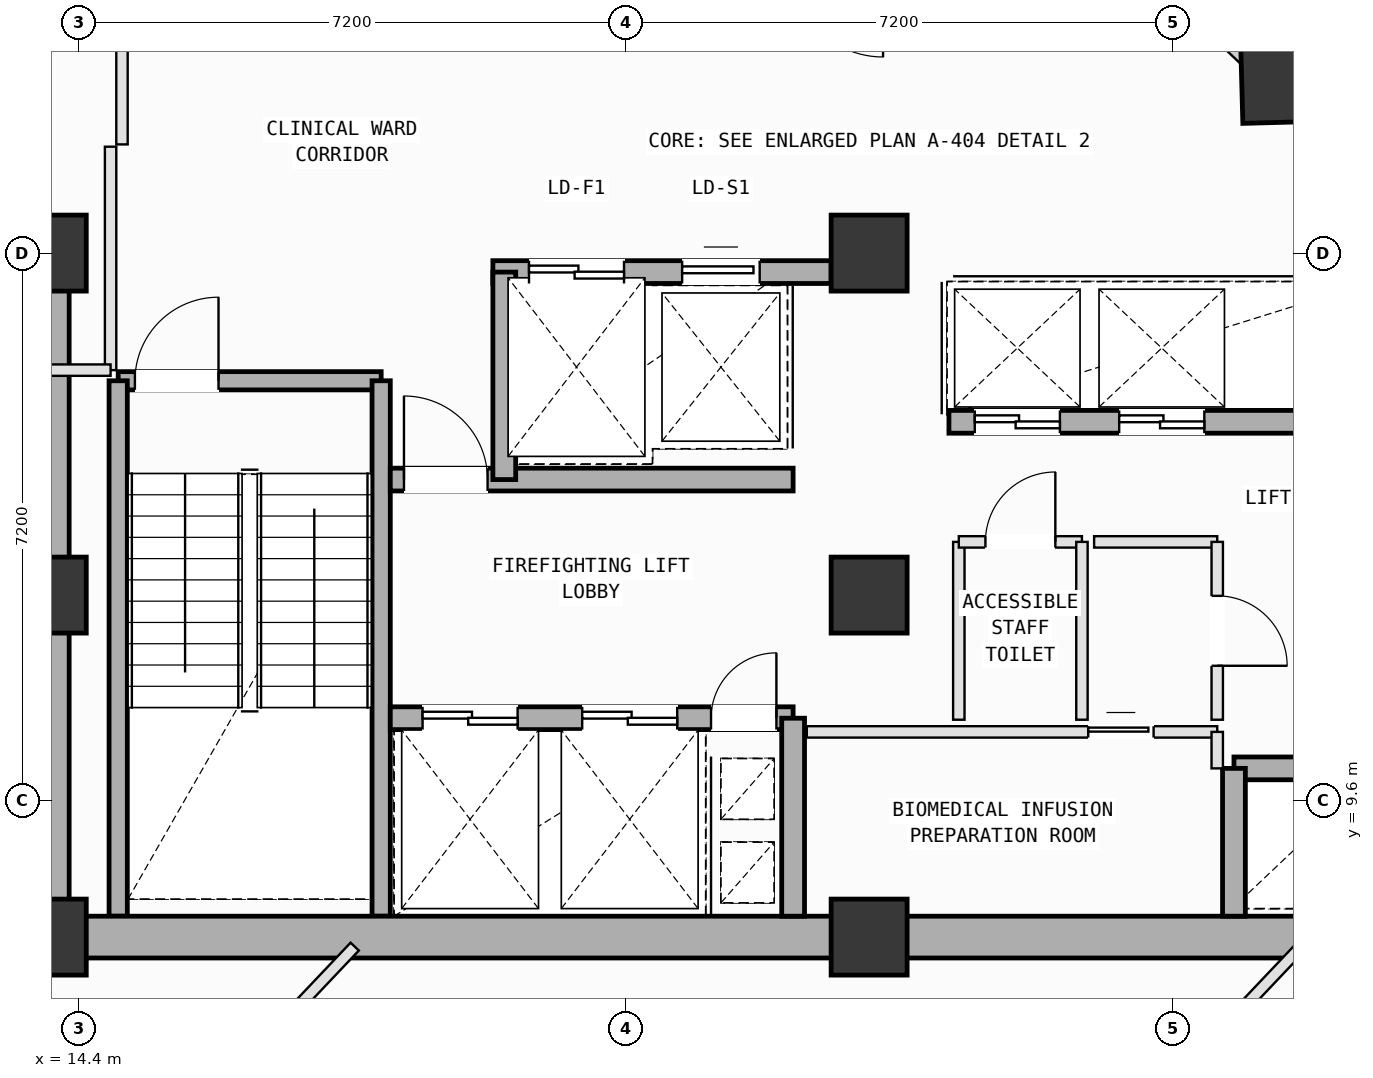
"""IFC4 building model, lengths in metres.
Left out: names, types, materials, properties, quantities, classifications, styles, units other than length and angle.
Written with IfcOpenShell. Run it as: python <this file> out.ifc"""

import sys

from ifc_helpers import new_model, si_unit, direction, frame, frame_2d, origin, origin_2d, place, context, subcontext, project, spatial, rectangle, extrude, element, fill, save


model = new_model("IFC4")
c1 = context("Model", 3, precision=1e-05, world=origin(), true_north=direction((0.0, 1.0)))
c2 = subcontext(c1, "Body", "Model", "MODEL_VIEW")
j1 = project(units=[si_unit("LENGTHUNIT", "METRE"), si_unit("PLANEANGLEUNIT", "RADIAN")], contexts=[c1])
p1 = place(None, origin())
s1 = spatial("IfcSite", under=j1, at=p1, CompositionType="ELEMENT")
p2 = place(p1, origin())
s2 = spatial("IfcBuilding", under=s1, at=p2, CompositionType="ELEMENT")
p3 = place(p2, frame((0.0, 0.0, 223.2)))
s3 = spatial("IfcBuildingStorey", under=s2, at=p3, CompositionType="ELEMENT", Elevation=223.2)
for number, where, z_axis, x_axis in (
    (1, (14.0, 7.8, 0.0), (0.0, 0.0, 1.0), (1.0, 0.0, 0.0)),
    (2, (14.0, 12.3, 0.0), (0.0, 0.0, 1.0), (1.0, 0.0, 0.0)),
    (3, (14.0, 16.8, 0.0), (0.0, 0.0, 1.0), (1.0, 0.0, 0.0)),
    (4, (24.8, 7.8, 0.0), (0.0, 0.0, 1.0), (1.0, 0.0, 0.0)),
    (5, (24.8, 12.3, 0.0), (0.0, 0.0, 1.0), (1.0, 0.0, 0.0)),
    (6, (24.8, 16.8, 0.0), (0.0, 0.0, 1.0), (1.0, 0.0, 0.0)),
):
    element("IfcColumn", number, at=place(p3, frame(where, z_axis=z_axis, x_axis=x_axis)), inside=s3, PredefinedType="COLUMN", context=c2, shape_type="SweptSolid", body=[
        extrude(rectangle(XDim=1.0, YDim=1.0, at=origin_2d()), origin(), (0.0, 0.0, 1.0), 4.0),
    ])
p4 = place(p3, frame((30.075, 19.116, 0.002), z_axis=(0.023694224565, -0.014411951024, 0.999615365723), x_axis=(-0.867784125792, 0.496167464826, 0.027722876321)))
e7 = element("IfcColumn", 7, at=p4, inside=s3, PredefinedType="COLUMN", context=c2, shape_type="SweptSolid", body=[
    extrude(rectangle(XDim=1.2, YDim=0.75, at=origin_2d()), origin(), (0.0, 0.0, 1.0), 3.998),
])
p5 = place(p3, frame((30.354, 19.411, 0.0), z_axis=(0.0, 0.0, 1.0), x_axis=(0.68771935581, 0.725976644007, 0.0)))
e8 = element("IfcWall", 8, at=p5, inside=s3, PredefinedType="SOLIDWALL", context=c2, shape_type="SweptSolid", body=[
    extrude(rectangle(XDim=6.158, YDim=0.28, at=frame_2d((3.079, 0.0))), origin(), (0.0, 0.0, 1.0), 3.265),
])
p6 = place(p5, frame((0.858, 0.0, 0.75)))
e9 = element("IfcOpeningElement", 9, at=p6, cuts=e8, PredefinedType="OPENING", context=c2, shape_type="SweptSolid", body=[
    extrude(rectangle(XDim=1.2, YDim=1.75, at=frame_2d((0.6, 0.875))), frame((0.0, 0.15, 0.0), z_axis=(0.0, -1.0, 0.0), x_axis=(1.0, 0.0, 0.0)), (0.0, 0.0, 1.0), 0.3),
])
p7 = place(p5, frame((4.406, 0.0, 0.75)))
e10 = element("IfcOpeningElement", 10, at=p7, cuts=e8, PredefinedType="OPENING", context=c2, shape_type="SweptSolid", body=[
    extrude(rectangle(XDim=1.2, YDim=1.75, at=frame_2d((0.6, 0.875))), frame((0.0, 0.15, 0.0), z_axis=(0.0, -1.0, 0.0), x_axis=(1.0, 0.0, 0.0)), (0.0, 0.0, 1.0), 0.3),
])
p8 = place(p3, frame((24.775, 24.138, 0.0), z_axis=(0.0, 0.0, 1.0), x_axis=(0.725970201199, -0.687726156962, 0.0)))
e11 = element("IfcWall", 11, at=p8, inside=s3, PredefinedType="SOLIDWALL", context=c2, shape_type="SweptSolid", body=[
    extrude(rectangle(XDim=6.958, YDim=0.28, at=frame_2d((3.479, 0.0))), origin(), (0.0, 0.0, 1.0), 3.245),
])
p9 = place(p3, frame((14.92, 15.12, 0.0), z_axis=(0.0, 0.0, 1.0), x_axis=(1.0, 0.0, 0.0)))
e12 = element("IfcWall", 12, at=p9, inside=s3, PredefinedType="SOLIDWALL", context=c2, shape_type="SweptSolid", body=[
    extrude(rectangle(XDim=3.46, YDim=0.24, at=frame_2d((1.73, 0.0))), origin(), (0.0, 0.0, 1.0), 3.78),
])
p10 = place(p9, frame((0.22, 0.0, 0.0)))
e13 = element("IfcOpeningElement", 13, at=p10, cuts=e12, PredefinedType="OPENING", context=c2, shape_type="SweptSolid", body=[
    extrude(rectangle(XDim=1.1, YDim=2.15, at=frame_2d((0.55, 1.075))), frame((0.0, 0.13, 0.0), z_axis=(0.0, -1.0, 0.0), x_axis=(1.0, 0.0, 0.0)), (0.0, 0.0, 1.0), 0.26),
])
for number, where, z_axis, x_axis in (
    (14, (18.38, 15.12, 0.0), (0.0, 0.0, 1.0), (0.0, -1.0, 0.0)),
    (15, (14.92, 8.075, 0.0), (0.0, 0.0, 1.0), (0.0, 1.0, 0.0)),
):
    element("IfcWall", number, at=place(p3, frame(where, z_axis=z_axis, x_axis=x_axis)), inside=s3, PredefinedType="SOLIDWALL", context=c2, shape_type="SweptSolid", body=[
        extrude(rectangle(XDim=7.045, YDim=0.24, at=frame_2d((3.522, 0.0))), origin(), (0.0, 0.0, 1.0), 3.78),
    ])
for number, where, z_axis, x_axis in (
    (16, (14.0, 7.8, 0.0), (0.0, 0.0, 1.0), (1.0, 0.0, 0.0)),
    (17, (24.8, 7.8, 0.0), (0.0, 0.0, 1.0), (1.0, 0.0, 0.0)),
):
    element("IfcWall", number, at=place(p3, frame(where, z_axis=z_axis, x_axis=x_axis)), inside=s3, PredefinedType="SHEAR", context=c2, shape_type="SweptSolid", body=[
        extrude(rectangle(XDim=10.8, YDim=0.55, at=frame_2d((5.4, 0.0))), origin(), (0.0, 0.0, 1.0), 3.78),
    ])
p11 = place(p3, frame((14.0, 16.8, 0.0), z_axis=(0.0, 0.0, 1.0), x_axis=(0.0, -1.0, 0.0)))
e18 = element("IfcWall", 18, at=p11, inside=s3, PredefinedType="SHEAR", context=c2, shape_type="SweptSolid", body=[
    extrude(rectangle(XDim=9.0, YDim=0.55, at=frame_2d((4.5, 0.0))), origin(), (0.0, 0.0, 1.0), 3.78),
])
p12 = place(p3, frame((19.85, 16.55, 0.0), z_axis=(0.0, 0.0, 1.0), x_axis=(1.0, 0.0, 0.0)))
e19 = element("IfcWall", 19, at=p12, inside=s3, PredefinedType="SOLIDWALL", context=c2, shape_type="SweptSolid", body=[
    extrude(rectangle(XDim=4.45, YDim=0.3, at=frame_2d((2.225, 0.0))), origin(), (0.0, 0.0, 1.0), 3.78),
])
p13 = place(p12, frame((0.475, 0.0, 0.0)))
e20 = element("IfcOpeningElement", 20, at=p13, cuts=e19, PredefinedType="OPENING", context=c2, shape_type="SweptSolid", body=[
    extrude(rectangle(XDim=1.25, YDim=2.18, at=frame_2d((0.625, 1.09))), frame((0.0, 0.16, 0.0), z_axis=(0.0, -1.0, 0.0), x_axis=(1.0, 0.0, 0.0)), (0.0, 0.0, 1.0), 0.32),
])
p14 = place(p12, frame((2.49, 0.0, 0.0)))
e21 = element("IfcOpeningElement", 21, at=p14, cuts=e19, PredefinedType="OPENING", context=c2, shape_type="SweptSolid", body=[
    extrude(rectangle(XDim=1.02, YDim=2.12, at=frame_2d((0.51, 1.06))), frame((0.0, 0.16, 0.0), z_axis=(0.0, -1.0, 0.0), x_axis=(1.0, 0.0, 0.0)), (0.0, 0.0, 1.0), 0.32),
])
p15 = place(p3, frame((18.5, 10.68, 0.0), z_axis=(0.0, 0.0, 1.0), x_axis=(1.0, 0.0, 0.0)))
e22 = element("IfcWall", 22, at=p15, inside=s3, PredefinedType="SOLIDWALL", context=c2, shape_type="SweptSolid", body=[
    extrude(rectangle(XDim=5.3, YDim=0.3, at=frame_2d((2.65, 0.0))), origin(), (0.0, 0.0, 1.0), 3.78),
])
p16 = place(p15, frame((4.22, 0.0, 0.0)))
e23 = element("IfcOpeningElement", 23, at=p16, cuts=e22, PredefinedType="OPENING", context=c2, shape_type="SweptSolid", body=[
    extrude(rectangle(XDim=0.86, YDim=2.06, at=frame_2d((0.43, 1.03))), frame((0.0, 0.16, 0.0), z_axis=(0.0, -1.0, 0.0), x_axis=(1.0, 0.0, 0.0)), (0.0, 0.0, 1.0), 0.32),
])
p17 = place(p15, frame((0.425, 0.0, 0.0)))
e24 = element("IfcOpeningElement", 24, at=p17, cuts=e22, PredefinedType="OPENING", context=c2, shape_type="SweptSolid", body=[
    extrude(rectangle(XDim=1.25, YDim=2.18, at=frame_2d((0.625, 1.09))), frame((0.0, 0.16, 0.0), z_axis=(0.0, -1.0, 0.0), x_axis=(1.0, 0.0, 0.0)), (0.0, 0.0, 1.0), 0.32),
])
p18 = place(p15, frame((2.525, 0.0, 0.0)))
e25 = element("IfcOpeningElement", 25, at=p18, cuts=e22, PredefinedType="OPENING", context=c2, shape_type="SweptSolid", body=[
    extrude(rectangle(XDim=1.25, YDim=2.18, at=frame_2d((0.625, 1.09))), frame((0.0, 0.16, 0.0), z_axis=(0.0, -1.0, 0.0), x_axis=(1.0, 0.0, 0.0)), (0.0, 0.0, 1.0), 0.32),
])
p19 = place(p3, frame((18.5, 13.82, 0.0), z_axis=(0.0, 0.0, 1.0), x_axis=(1.0, 0.0, 0.0)))
e26 = element("IfcWall", 26, at=p19, inside=s3, PredefinedType="SOLIDWALL", context=c2, shape_type="SweptSolid", body=[
    extrude(rectangle(XDim=5.3, YDim=0.3, at=frame_2d((2.65, 0.0))), origin(), (0.0, 0.0, 1.0), 3.78),
])
p20 = place(p19, frame((0.18, 0.0, 0.0)))
e27 = element("IfcOpeningElement", 27, at=p20, cuts=e26, PredefinedType="OPENING", context=c2, shape_type="SweptSolid", body=[
    extrude(rectangle(XDim=1.1, YDim=2.15, at=frame_2d((0.55, 1.075))), frame((0.0, 0.16, 0.0), z_axis=(0.0, -1.0, 0.0), x_axis=(1.0, 0.0, 0.0)), (0.0, 0.0, 1.0), 0.32),
])
p21 = place(p3, frame((23.8, 8.075, 0.0), z_axis=(0.0, 0.0, 1.0), x_axis=(0.0, 1.0, 0.0)))
e28 = element("IfcWall", 28, at=p21, inside=s3, PredefinedType="SOLIDWALL", context=c2, shape_type="SweptSolid", body=[
    extrude(rectangle(XDim=2.605, YDim=0.3, at=frame_2d((1.302, 0.0))), origin(), (0.0, 0.0, 1.0), 3.78),
])
p22 = place(p3, frame((20.0, 13.82, 0.0), z_axis=(0.0, 0.0, 1.0), x_axis=(0.0, 1.0, 0.0)))
e29 = element("IfcWall", 29, at=p22, inside=s3, PredefinedType="SOLIDWALL", context=c2, shape_type="SweptSolid", body=[
    extrude(rectangle(XDim=2.73, YDim=0.3, at=frame_2d((1.365, 0.0))), origin(), (0.0, 0.0, 1.0), 3.78),
])
p23 = place(p3, frame((29.6, 10.02, 0.0), z_axis=(0.0, 0.0, 1.0), x_axis=(1.0, 0.0, 0.0)))
e30 = element("IfcWall", 30, at=p23, inside=s3, PredefinedType="SOLIDWALL", context=c2, shape_type="SweptSolid", body=[
    extrude(rectangle(XDim=1.7, YDim=0.3, at=frame_2d((0.85, 0.0))), origin(), (0.0, 0.0, 1.0), 3.78),
])
p24 = place(p3, frame((29.6, 8.075, 0.0), z_axis=(0.0, 0.0, 1.0), x_axis=(0.0, 1.0, 0.0)))
e31 = element("IfcWall", 31, at=p24, inside=s3, PredefinedType="SOLIDWALL", context=c2, shape_type="SweptSolid", body=[
    extrude(rectangle(XDim=1.945, YDim=0.3, at=frame_2d((0.973, 0.0))), origin(), (0.0, 0.0, 1.0), 3.78),
])
p25 = place(p3, frame((25.85, 14.58, 0.0), z_axis=(0.0, 0.0, 1.0), x_axis=(1.0, 0.0, 0.0)))
e32 = element("IfcWall", 32, at=p25, inside=s3, PredefinedType="SOLIDWALL", context=c2, shape_type="SweptSolid", body=[
    extrude(rectangle(XDim=5.45, YDim=0.3, at=frame_2d((2.725, 0.0))), origin(), (0.0, 0.0, 1.0), 3.78),
])
p26 = place(p25, frame((0.34, 0.0, 0.0)))
e33 = element("IfcOpeningElement", 33, at=p26, cuts=e32, PredefinedType="OPENING", context=c2, shape_type="SweptSolid", body=[
    extrude(rectangle(XDim=1.12, YDim=2.15, at=frame_2d((0.56, 1.075))), frame((0.0, 0.16, 0.0), z_axis=(0.0, -1.0, 0.0), x_axis=(1.0, 0.0, 0.0)), (0.0, 0.0, 1.0), 0.32),
])
p27 = place(p25, frame((2.24, 0.0, 0.0)))
e34 = element("IfcOpeningElement", 34, at=p27, cuts=e32, PredefinedType="OPENING", context=c2, shape_type="SweptSolid", body=[
    extrude(rectangle(XDim=1.12, YDim=2.15, at=frame_2d((0.56, 1.075))), frame((0.0, 0.16, 0.0), z_axis=(0.0, -1.0, 0.0), x_axis=(1.0, 0.0, 0.0)), (0.0, 0.0, 1.0), 0.32),
])
p28 = place(p3, frame((23.98, 10.5, 0.0), z_axis=(0.0, 0.0, 1.0), x_axis=(1.0, 0.0, 0.0)))
e35 = element("IfcWall", 35, at=p28, inside=s3, PredefinedType="PARTITIONING", context=c2, shape_type="SweptSolid", body=[
    extrude(rectangle(XDim=5.4, YDim=0.15, at=frame_2d((2.7, 0.0))), origin(), (0.0, 0.0, 1.0), 3.78),
])
p29 = place(p28, frame((3.703, 0.0, 0.0)))
e36 = element("IfcOpeningElement", 36, at=p29, cuts=e35, PredefinedType="OPENING", context=c2, shape_type="SweptSolid", body=[
    extrude(rectangle(XDim=0.86, YDim=2.06, at=frame_2d((0.43, 1.03))), frame((0.0, 0.085, 0.0), z_axis=(0.0, -1.0, 0.0), x_axis=(1.0, 0.0, 0.0)), (0.0, 0.0, 1.0), 0.17),
])
p30 = place(p3, frame((29.38, 10.5, 0.0), z_axis=(0.0, 0.0, 1.0), x_axis=(0.0, -1.0, 0.0)))
e37 = element("IfcWall", 37, at=p30, inside=s3, PredefinedType="PARTITIONING", context=c2, shape_type="SweptSolid", body=[
    extrude(rectangle(XDim=0.48, YDim=0.15, at=frame_2d((0.24, 0.0))), origin(), (0.0, 0.0, 1.0), 3.78),
])
p31 = place(p3, frame((25.98, 10.66, 0.0), z_axis=(0.0, 0.0, 1.0), x_axis=(0.0, 1.0, 0.0)))
e38 = element("IfcWall", 38, at=p31, inside=s3, PredefinedType="PARTITIONING", context=c2, shape_type="SweptSolid", body=[
    extrude(rectangle(XDim=2.34, YDim=0.15, at=frame_2d((1.17, 0.0))), origin(), (0.0, 0.0, 1.0), 3.78),
])
p32 = place(p3, frame((25.98, 13.0, 0.0), z_axis=(0.0, 0.0, 1.0), x_axis=(1.0, 0.0, 0.0)))
e39 = element("IfcWall", 39, at=p32, inside=s3, PredefinedType="PARTITIONING", context=c2, shape_type="SweptSolid", body=[
    extrude(rectangle(XDim=1.62, YDim=0.15, at=frame_2d((0.81, 0.0))), origin(), (0.0, 0.0, 1.0), 3.78),
])
p33 = place(p32, frame((0.35, 0.0, 0.0)))
e40 = element("IfcOpeningElement", 40, at=p33, cuts=e39, PredefinedType="OPENING", context=c2, shape_type="SweptSolid", body=[
    extrude(rectangle(XDim=0.92, YDim=2.1, at=frame_2d((0.46, 1.05))), frame((0.0, 0.085, 0.0), z_axis=(0.0, -1.0, 0.0), x_axis=(1.0, 0.0, 0.0)), (0.0, 0.0, 1.0), 0.17),
])
p34 = place(p3, frame((27.6, 13.0, 0.0), z_axis=(0.0, 0.0, 1.0), x_axis=(0.0, -1.0, 0.0)))
e41 = element("IfcWall", 41, at=p34, inside=s3, PredefinedType="PARTITIONING", context=c2, shape_type="SweptSolid", body=[
    extrude(rectangle(XDim=2.34, YDim=0.15, at=frame_2d((1.17, 0.0))), origin(), (0.0, 0.0, 1.0), 3.78),
])
p35 = place(p3, frame((27.76, 13.0, 0.0), z_axis=(0.0, 0.0, 1.0), x_axis=(1.0, 0.0, 0.0)))
e42 = element("IfcWall", 42, at=p35, inside=s3, PredefinedType="PARTITIONING", context=c2, shape_type="SweptSolid", body=[
    extrude(rectangle(XDim=1.62, YDim=0.15, at=frame_2d((0.81, 0.0))), origin(), (0.0, 0.0, 1.0), 3.78),
])
p36 = place(p3, frame((29.38, 13.0, 0.0), z_axis=(0.0, 0.0, 1.0), x_axis=(0.0, -1.0, 0.0)))
e43 = element("IfcWall", 43, at=p36, inside=s3, PredefinedType="PARTITIONING", context=c2, shape_type="SweptSolid", body=[
    extrude(rectangle(XDim=2.34, YDim=0.15, at=frame_2d((1.17, 0.0))), origin(), (0.0, 0.0, 1.0), 3.78),
])
p37 = place(p36, frame((0.71, 0.0, 0.0)))
e44 = element("IfcOpeningElement", 44, at=p37, cuts=e43, PredefinedType="OPENING", context=c2, shape_type="SweptSolid", body=[
    extrude(rectangle(XDim=0.92, YDim=2.1, at=frame_2d((0.46, 1.05))), frame((0.0, 0.085, 0.0), z_axis=(0.0, -1.0, 0.0), x_axis=(1.0, 0.0, 0.0)), (0.0, 0.0, 1.0), 0.17),
])
p38 = place(p3, frame((27.801, 3.847, 0.0), z_axis=(0.0, 0.0, 1.0), x_axis=(0.687775466328, 0.725923486269, 0.0)))
e45 = element("IfcWall", 45, at=p38, inside=s3, PredefinedType="PARTITIONING", context=c2, shape_type="SweptSolid", body=[
    extrude(rectangle(XDim=5.273, YDim=0.15, at=frame_2d((2.637, 0.0))), origin(), (0.0, 0.0, 1.0), 3.78),
])
p39 = place(p3, frame((15.146, 4.629, 0.0), z_axis=(0.0, 0.0, 1.0), x_axis=(0.687765627003, 0.725932808401, 0.0)))
e46 = element("IfcWall", 46, at=p39, inside=s3, PredefinedType="PARTITIONING", context=c2, shape_type="SweptSolid", body=[
    extrude(rectangle(XDim=4.196, YDim=0.15, at=frame_2d((2.098, 0.0))), origin(), (0.0, 0.0, 1.0), 3.78),
])
p40 = place(p39, frame((1.547, 0.0, 0.0)))
e47 = element("IfcOpeningElement", 47, at=p40, cuts=e46, PredefinedType="OPENING", context=c2, shape_type="SweptSolid", body=[
    extrude(rectangle(XDim=0.86, YDim=2.06, at=frame_2d((0.43, 1.03))), frame((0.0, 0.085, 0.0), z_axis=(0.0, -1.0, 0.0), x_axis=(1.0, 0.0, 0.0)), (0.0, 0.0, 1.0), 0.17),
])
p41 = place(p3, frame((30.484, 7.675, 0.0), z_axis=(0.0, 0.0, 1.0), x_axis=(-0.687675654544, -0.726018039823, 0.0)))
e48 = element("IfcWall", 48, at=p41, inside=s3, PredefinedType="PARTITIONING", context=c2, shape_type="SweptSolid", body=[
    extrude(rectangle(XDim=12.76, YDim=0.15, at=frame_2d((6.38, 0.0))), origin(), (0.0, 0.0, 1.0), 3.78),
])
p42 = place(p3, frame((14.97, 20.55, 0.0), z_axis=(0.0, 0.0, 1.0), x_axis=(0.0, -1.0, 0.0)))
e49 = element("IfcWall", 49, at=p42, inside=s3, PredefinedType="PARTITIONING", context=c2, shape_type="SweptSolid", body=[
    extrude(rectangle(XDim=2.32, YDim=0.15, at=frame_2d((1.16, 0.0))), origin(), (0.0, 0.0, 1.0), 3.78),
])
p43 = place(p3, frame((14.82, 18.2, 0.0), z_axis=(0.0, 0.0, 1.0), x_axis=(0.0, -1.0, 0.0)))
e50 = element("IfcWall", 50, at=p43, inside=s3, PredefinedType="PARTITIONING", context=c2, shape_type="SweptSolid", body=[
    extrude(rectangle(XDim=2.94, YDim=0.15, at=frame_2d((1.47, 0.0))), origin(), (0.0, 0.0, 1.0), 3.78),
])
p44 = place(p3, frame((14.82, 15.26, 0.0), z_axis=(0.0, 0.0, 1.0), x_axis=(-1.0, 0.0, 0.0)))
e51 = element("IfcWall", 51, at=p44, inside=s3, PredefinedType="PARTITIONING", context=c2, shape_type="SweptSolid", body=[
    extrude(rectangle(XDim=1.12, YDim=0.15, at=frame_2d((0.56, 0.0))), origin(), (0.0, 0.0, 1.0), 3.78),
])
p45 = place(p10, origin())
e52 = element("IfcDoor", 52, at=p45, inside=s3, OperationType="SINGLE_SWING_RIGHT", PredefinedType="DOOR", context=c2, shape_type="SweptSolid", body=[
    extrude(rectangle(XDim=1.1, YDim=2.15, at=frame_2d((0.55, 1.075))), frame((0.0, 0.025, 0.0), z_axis=(0.0, -1.0, 0.0), x_axis=(1.0, 0.0, 0.0)), (0.0, 0.0, 1.0), 0.05),
])
fill(e13, e52)
p46 = place(p16, origin())
e53 = element("IfcDoor", 53, at=p46, inside=s3, OperationType="SINGLE_SWING_RIGHT", PredefinedType="DOOR", context=c2, shape_type="SweptSolid", body=[
    extrude(rectangle(XDim=0.86, YDim=2.06, at=frame_2d((0.43, 1.03))), frame((0.0, 0.025, 0.0), z_axis=(0.0, -1.0, 0.0), x_axis=(1.0, 0.0, 0.0)), (0.0, 0.0, 1.0), 0.05),
])
fill(e23, e53)
p47 = place(p20, origin())
e54 = element("IfcDoor", 54, at=p47, inside=s3, OperationType="SINGLE_SWING_LEFT", PredefinedType="DOOR", context=c2, shape_type="SweptSolid", body=[
    extrude(rectangle(XDim=1.1, YDim=2.15, at=frame_2d((0.55, 1.075))), frame((0.0, 0.025, 0.0), z_axis=(0.0, -1.0, 0.0), x_axis=(1.0, 0.0, 0.0)), (0.0, 0.0, 1.0), 0.05),
])
fill(e27, e54)
p48 = place(p17, origin())
e55 = element("IfcDoor", 55, at=p48, inside=s3, OperationType="DOUBLE_DOOR_SLIDING", PredefinedType="DOOR", context=c2, shape_type="SweptSolid", body=[
    extrude(rectangle(XDim=1.25, YDim=2.18, at=frame_2d((0.625, 1.09))), frame((0.0, 0.025, 0.0), z_axis=(0.0, -1.0, 0.0), x_axis=(1.0, 0.0, 0.0)), (0.0, 0.0, 1.0), 0.05),
])
fill(e24, e55)
p49 = place(p18, origin())
e56 = element("IfcDoor", 56, at=p49, inside=s3, OperationType="DOUBLE_DOOR_SLIDING", PredefinedType="DOOR", context=c2, shape_type="SweptSolid", body=[
    extrude(rectangle(XDim=1.25, YDim=2.18, at=frame_2d((0.625, 1.09))), frame((0.0, 0.025, 0.0), z_axis=(0.0, -1.0, 0.0), x_axis=(1.0, 0.0, 0.0)), (0.0, 0.0, 1.0), 0.05),
])
fill(e25, e56)
p50 = place(p26, origin())
e57 = element("IfcDoor", 57, at=p50, inside=s3, OperationType="DOUBLE_DOOR_SLIDING", PredefinedType="DOOR", context=c2, shape_type="SweptSolid", body=[
    extrude(rectangle(XDim=1.12, YDim=2.15, at=frame_2d((0.56, 1.075))), frame((0.0, 0.025, 0.0), z_axis=(0.0, -1.0, 0.0), x_axis=(1.0, 0.0, 0.0)), (0.0, 0.0, 1.0), 0.05),
])
fill(e33, e57)
p51 = place(p27, origin())
e58 = element("IfcDoor", 58, at=p51, inside=s3, OperationType="DOUBLE_DOOR_SLIDING", PredefinedType="DOOR", context=c2, shape_type="SweptSolid", body=[
    extrude(rectangle(XDim=1.12, YDim=2.15, at=frame_2d((0.56, 1.075))), frame((0.0, 0.025, 0.0), z_axis=(0.0, -1.0, 0.0), x_axis=(1.0, 0.0, 0.0)), (0.0, 0.0, 1.0), 0.05),
])
fill(e34, e58)
p52 = place(p13, origin())
e59 = element("IfcDoor", 59, at=p52, inside=s3, OperationType="DOUBLE_DOOR_SLIDING", PredefinedType="DOOR", context=c2, shape_type="SweptSolid", body=[
    extrude(rectangle(XDim=1.25, YDim=2.18, at=frame_2d((0.625, 1.09))), frame((0.0, 0.025, 0.0), z_axis=(0.0, -1.0, 0.0), x_axis=(1.0, 0.0, 0.0)), (0.0, 0.0, 1.0), 0.05),
])
fill(e20, e59)
p53 = place(p14, origin())
e60 = element("IfcDoor", 60, at=p53, inside=s3, OperationType="SLIDING_TO_LEFT", PredefinedType="DOOR", context=c2, shape_type="SweptSolid", body=[
    extrude(rectangle(XDim=1.02, YDim=2.12, at=frame_2d((0.51, 1.06))), frame((0.0, 0.025, 0.0), z_axis=(0.0, -1.0, 0.0), x_axis=(1.0, 0.0, 0.0)), (0.0, 0.0, 1.0), 0.05),
])
fill(e21, e60)
p54 = place(p33, origin())
e61 = element("IfcDoor", 61, at=p54, inside=s3, OperationType="SINGLE_SWING_RIGHT", PredefinedType="DOOR", context=c2, shape_type="SweptSolid", body=[
    extrude(rectangle(XDim=0.92, YDim=2.1, at=frame_2d((0.46, 1.05))), frame((0.0, 0.025, 0.0), z_axis=(0.0, -1.0, 0.0), x_axis=(1.0, 0.0, 0.0)), (0.0, 0.0, 1.0), 0.05),
])
fill(e40, e61)
p55 = place(p37, origin())
e62 = element("IfcDoor", 62, at=p55, inside=s3, OperationType="SINGLE_SWING_RIGHT", PredefinedType="DOOR", context=c2, shape_type="SweptSolid", body=[
    extrude(rectangle(XDim=0.92, YDim=2.1, at=frame_2d((0.46, 1.05))), frame((0.0, 0.025, 0.0), z_axis=(0.0, -1.0, 0.0), x_axis=(1.0, 0.0, 0.0)), (0.0, 0.0, 1.0), 0.05),
])
fill(e44, e62)
p56 = place(p29, origin())
e63 = element("IfcDoor", 63, at=p56, inside=s3, OperationType="SLIDING_TO_LEFT", PredefinedType="DOOR", context=c2, shape_type="SweptSolid", body=[
    extrude(rectangle(XDim=0.86, YDim=2.06, at=frame_2d((0.43, 1.03))), frame((0.0, 0.025, 0.0), z_axis=(0.0, -1.0, 0.0), x_axis=(1.0, 0.0, 0.0)), (0.0, 0.0, 1.0), 0.05),
])
fill(e36, e63)
save(model, sys.argv[1])
